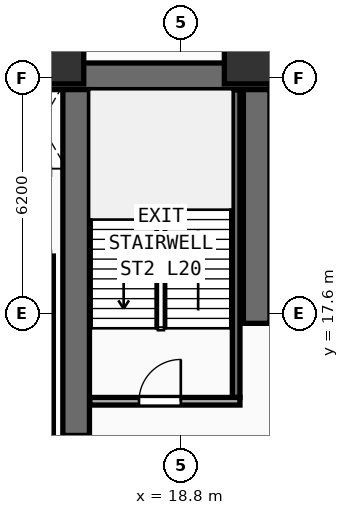
"""IFC4 building model, lengths in metres.
Left out: names, types, materials, properties, quantities, classifications, styles, units other than length and angle.
Written with IfcOpenShell. Run it as: python <this file> out.ifc"""

import sys

from ifc_helpers import new_model, si_unit, direction, frame, frame_2d, origin, origin_2d, place, context, subcontext, project, spatial, rectangle, extrude, element, fill, save


model = new_model("IFC4")
c1 = context("Model", 3, precision=1e-05, world=origin(), true_north=direction((0.0, 1.0)))
c2 = subcontext(c1, "Body", "Model", "MODEL_VIEW")
j1 = project(units=[si_unit("LENGTHUNIT", "METRE"), si_unit("PLANEANGLEUNIT", "RADIAN")], contexts=[c1])
p1 = place(None, origin())
s1 = spatial("IfcSite", under=j1, at=p1, CompositionType="ELEMENT")
p2 = place(p1, origin())
s2 = spatial("IfcBuilding", under=s1, at=p2, CompositionType="ELEMENT")
p3 = place(p2, frame((0.0, 0.0, 79.0)))
s3 = spatial("IfcBuildingStorey", under=s2, at=p3, CompositionType="ELEMENT", Elevation=79.0)
p4 = place(p3, frame((7.1, 23.85, 0.0), z_axis=(0.0, 0.0, 1.0), x_axis=(1.0, 0.0, 0.0)))
e1 = element("IfcWall", 1, at=p4, inside=s3, PredefinedType="SHEAR", context=c2, shape_type="SweptSolid", body=[
    extrude(rectangle(XDim=14.05, YDim=0.7, at=frame_2d((7.025, 0.0))), origin(), (0.0, 0.0, 1.0), 3.42),
])
p5 = place(p3, frame((20.8, 17.35, 0.0), z_axis=(0.0, 0.0, 1.0), x_axis=(0.0, 1.0, 0.0)))
e2 = element("IfcWall", 2, at=p5, inside=s3, PredefinedType="SHEAR", context=c2, shape_type="SweptSolid", body=[
    extrude(rectangle(XDim=6.15, YDim=0.7, at=frame_2d((3.075, 0.0))), origin(), (0.0, 0.0, 1.0), 3.42),
])
p6 = place(p3, frame((16.05, 14.4, 0.0), z_axis=(0.0, 0.0, 1.0), x_axis=(0.0, 1.0, 0.0)))
e3 = element("IfcWall", 3, at=p6, inside=s3, PredefinedType="SHEAR", context=c2, shape_type="SweptSolid", body=[
    extrude(rectangle(XDim=9.1, YDim=0.7, at=frame_2d((4.55, 0.0))), origin(), (0.0, 0.0, 1.0), 3.42),
])
for number, where, z_axis, x_axis in (
    (4, (15.45, 24.45, 0.0), (0.0, 0.0, 1.0), (1.0, 0.0, 0.0)),
    (5, (20.75, 24.45, 0.0), (0.0, 0.0, 1.0), (1.0, 0.0, 0.0)),
):
    element("IfcColumn", number, at=place(p3, frame(where, z_axis=z_axis, x_axis=x_axis)), inside=s3, PredefinedType="COLUMN", context=c2, shape_type="SweptSolid", body=[
        extrude(rectangle(XDim=1.6, YDim=1.6, at=origin_2d()), origin(), (0.0, 0.0, 1.0), 3.42),
    ])
p7 = place(p3, frame((20.26, 15.4, 0.0), z_axis=(0.0, 0.0, 1.0), x_axis=(0.0, 1.0, 0.0)))
e6 = element("IfcWall", 6, at=p7, inside=s3, PredefinedType="SHEAR", context=c2, shape_type="SweptSolid", body=[
    extrude(rectangle(XDim=8.09, YDim=0.2, at=frame_2d((4.045, 0.0))), origin(), (0.0, 0.0, 1.0), 3.42),
])
p8 = place(p3, frame((16.41, 15.3, 0.0), z_axis=(0.0, 0.0, 1.0), x_axis=(1.0, 0.0, 0.0)))
e7 = element("IfcWall", 7, at=p8, inside=s3, PredefinedType="PARTITIONING", context=c2, shape_type="SweptSolid", body=[
    extrude(rectangle(XDim=3.95, YDim=0.2, at=frame_2d((1.975, 0.0))), origin(), (0.0, 0.0, 1.0), 3.42),
])
p9 = place(p8, frame((1.294, 0.0, 0.0)))
e8 = element("IfcOpeningElement", 8, at=p9, cuts=e7, PredefinedType="OPENING", context=c2, shape_type="SweptSolid", body=[
    extrude(rectangle(XDim=1.1, YDim=2.2, at=frame_2d((0.55, 1.1))), frame((0.0, 0.11, 0.0), z_axis=(0.0, -1.0, 0.0), x_axis=(1.0, 0.0, 0.0)), (0.0, 0.0, 1.0), 0.22),
])
p10 = place(p3, frame((15.35, 14.22, 0.0), z_axis=(0.0, 0.0, 1.0), x_axis=(0.0, 1.0, 0.0)))
e9 = element("IfcWall", 9, at=p10, inside=s3, PredefinedType="PARTITIONING", context=c2, shape_type="SweptSolid", body=[
    extrude(rectangle(XDim=2.23, YDim=0.2, at=frame_2d((1.115, 0.0))), origin(), (0.0, 0.0, 1.0), 3.42),
])
p11 = place(p3, frame((15.35, 16.45, 0.0), z_axis=(0.0, 0.0, 1.0), x_axis=(0.0, 1.0, 0.0)))
e10 = element("IfcWall", 10, at=p11, inside=s3, PredefinedType="PARTITIONING", context=c2, shape_type="SweptSolid", body=[
    extrude(rectangle(XDim=2.67, YDim=0.2, at=frame_2d((1.335, 0.0))), origin(), (0.0, 0.0, 1.0), 3.42),
])
p12 = place(p9, origin())
e11 = element("IfcDoor", 11, at=p12, inside=s3, OperationType="SINGLE_SWING_RIGHT", PredefinedType="DOOR", context=c2, shape_type="SweptSolid", body=[
    extrude(rectangle(XDim=1.1, YDim=2.2, at=frame_2d((0.55, 1.1))), frame((0.0, 0.025, 0.0), z_axis=(0.0, -1.0, 0.0), x_axis=(1.0, 0.0, 0.0)), (0.0, 0.0, 1.0), 0.05),
])
fill(e8, e11)
save(model, sys.argv[1])
